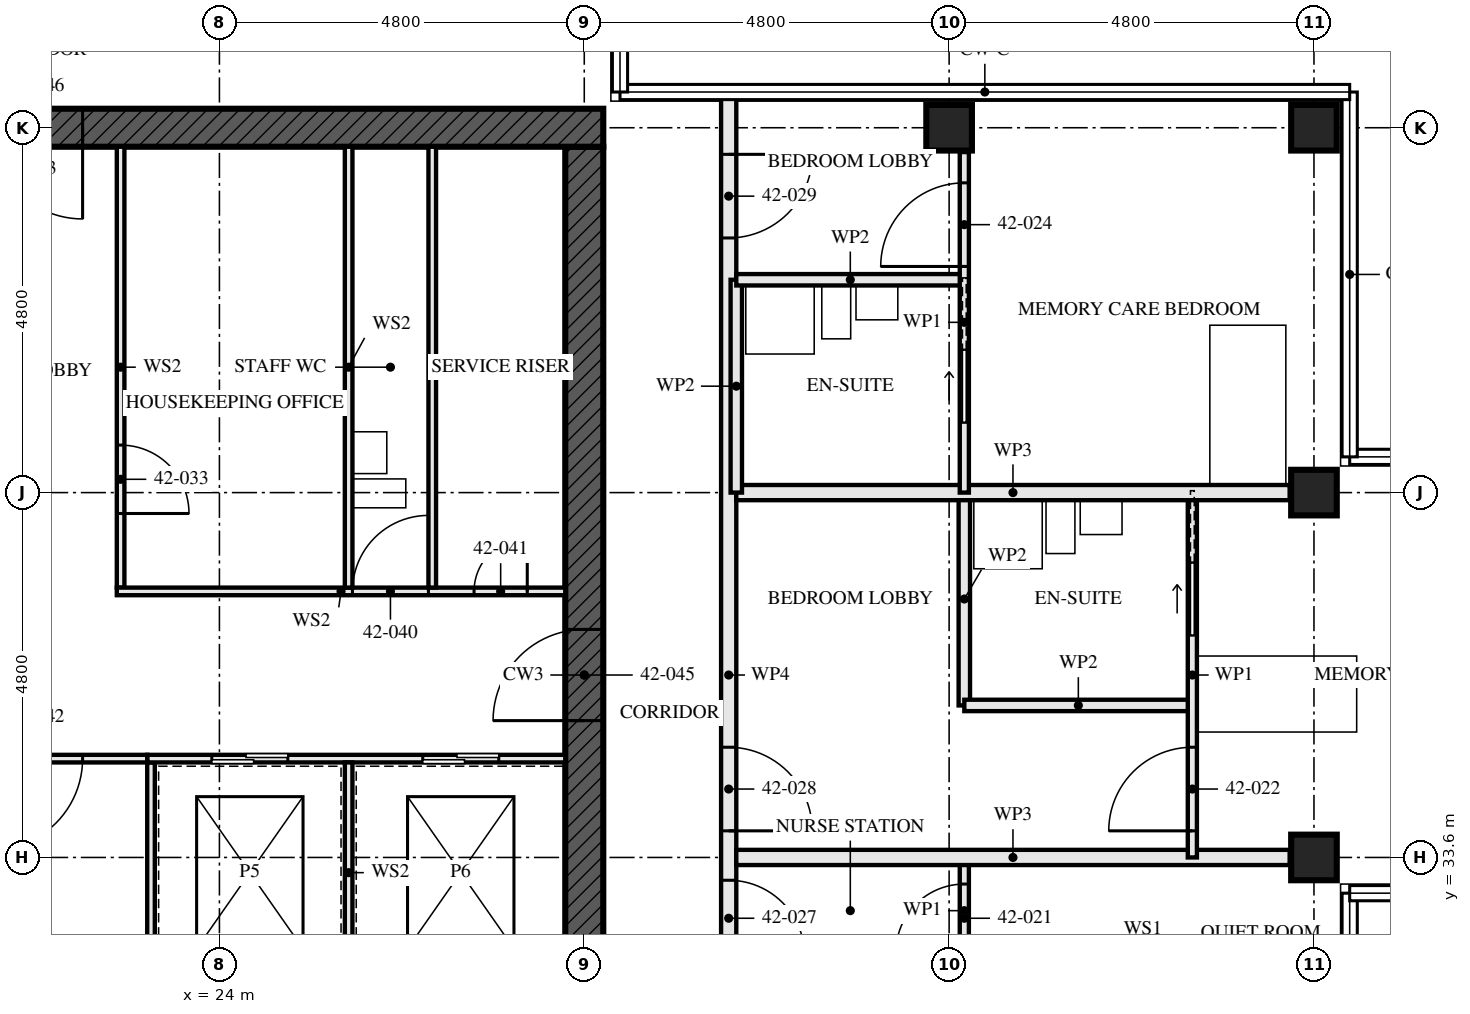
"""IFC4 building model, lengths in metres.
Left out: names, types, materials, properties, quantities, classifications, styles, units other than length and angle.
Written with IfcOpenShell. Run it as: python <this file> out.ifc"""

import sys

from ifc_helpers import new_model, si_unit, direction, frame, frame_2d, origin, origin_2d, place, context, subcontext, project, spatial, rectangle, hollow_rectangle, extrude, element, fill, save


model = new_model("IFC4")
c1 = context("Model", 3, precision=1e-05, world=origin(), true_north=direction((0.0, 1.0)))
c2 = subcontext(c1, "Body", "Model", "MODEL_VIEW")
j1 = project(units=[si_unit("LENGTHUNIT", "METRE"), si_unit("PLANEANGLEUNIT", "RADIAN")], contexts=[c1])
p1 = place(None, origin())
s1 = spatial("IfcSite", under=j1, at=p1, CompositionType="ELEMENT")
p2 = place(p1, origin())
s2 = spatial("IfcBuilding", under=s1, at=p2, CompositionType="ELEMENT")
p3 = place(p2, frame((0.0, 0.0, 155.0)))
s3 = spatial("IfcBuildingStorey", under=s2, at=p3, CompositionType="ELEMENT", Elevation=155.0)
p4 = place(p3, frame((33.6, 43.2, 0.0), z_axis=(0.0, 0.0, 1.0), x_axis=(0.0, 1.0, 0.0)))
e1 = element("IfcColumn", 1, at=p4, inside=s3, PredefinedType="COLUMN", context=c2, shape_type="SweptSolid", body=[
    extrude(hollow_rectangle(XDim=0.6, YDim=0.6, WallThickness=0.08, at=origin_2d()), origin(), (0.0, 0.0, 1.0), 3.5),
])
for number, where, z_axis, x_axis in (
    (2, (38.4, 33.6, 0.0), (0.0, 0.0, 1.0), (0.0, 1.0, 0.0)),
    (3, (38.4, 38.4, 0.0), (0.0, 0.0, 1.0), (0.0, 1.0, 0.0)),
    (4, (38.4, 43.2, 0.0), (0.0, 0.0, 1.0), (0.0, 1.0, 0.0)),
):
    element("IfcColumn", number, at=place(p3, frame(where, z_axis=z_axis, x_axis=x_axis)), inside=s3, PredefinedType="COLUMN", context=c2, shape_type="SweptSolid", body=[
        extrude(hollow_rectangle(XDim=0.6, YDim=0.6, WallThickness=0.06, at=origin_2d()), origin(), (0.0, 0.0, 1.0), 3.5),
    ])
p5 = place(p3, frame((29.05, 43.2, -0.17), z_axis=(0.0, 0.0, 1.0), x_axis=(-1.0, 0.0, 0.0)))
e5 = element("IfcWall", 5, at=p5, inside=s3, PredefinedType="SHEAR", context=c2, shape_type="SweptSolid", body=[
    extrude(rectangle(XDim=14.9, YDim=0.5, at=frame_2d((7.45, 0.0))), origin(), (0.0, 0.0, 1.0), 3.5),
])
p6 = place(p5, frame((6.85, 0.0, 0.17)))
e6 = element("IfcOpeningElement", 6, at=p6, cuts=e5, PredefinedType="OPENING", context=c2, shape_type="SweptSolid", body=[
    extrude(rectangle(XDim=1.2, YDim=2.1, at=frame_2d((0.6, 1.05))), frame((0.0, 0.26, 0.0), z_axis=(0.0, -1.0, 0.0), x_axis=(1.0, 0.0, 0.0)), (0.0, 0.0, 1.0), 0.521),
])
p7 = place(p3, frame((28.8, 29.05, -0.17), z_axis=(0.0, 0.0, 1.0), x_axis=(0.0, 1.0, 0.0)))
e7 = element("IfcWall", 7, at=p7, inside=s3, PredefinedType="SHEAR", context=c2, shape_type="SweptSolid", body=[
    extrude(rectangle(XDim=13.9, YDim=0.5, at=frame_2d((6.95, 0.0))), origin(), (0.0, 0.0, 1.0), 3.5),
])
p8 = place(p7, frame((6.35, 0.0, 0.17)))
e8 = element("IfcOpeningElement", 8, at=p8, cuts=e7, PredefinedType="OPENING", context=c2, shape_type="SweptSolid", body=[
    extrude(rectangle(XDim=1.2, YDim=2.1, at=frame_2d((0.6, 1.05))), frame((0.0, 0.26, 0.0), z_axis=(0.0, -1.0, 0.0), x_axis=(1.0, 0.0, 0.0)), (0.0, 0.0, 1.0), 0.521),
])
p9 = place(p3, frame((33.8, 32.2, 0.0), z_axis=(0.0, 0.0, 1.0), x_axis=(0.0, 1.0, 0.0)))
e9 = element("IfcWall", 9, at=p9, inside=s3, PredefinedType="PARTITIONING", context=c2, shape_type="SweptSolid", body=[
    extrude(rectangle(XDim=1.4, YDim=0.12, at=frame_2d((0.7, 0.0))), origin(), (0.0, 0.0, 1.0), 3.33),
])
p10 = place(p9, frame((0.15, 0.0, 0.0)))
e10 = element("IfcOpeningElement", 10, at=p10, cuts=e9, PredefinedType="OPENING", context=c2, shape_type="SweptSolid", body=[
    extrude(rectangle(XDim=0.9, YDim=2.1, at=frame_2d((0.45, 1.05))), frame((0.0, 0.071, 0.0), z_axis=(0.0, -1.0, 0.0), x_axis=(1.0, 0.0, 0.0)), (0.0, 0.0, 1.0), 0.141),
])
p11 = place(p3, frame((38.08, 33.6, 0.0), z_axis=(0.0, 0.0, 1.0), x_axis=(-1.0, 0.0, 0.0)))
e11 = element("IfcWall", 11, at=p11, inside=s3, PredefinedType="PARTITIONING", context=c2, shape_type="SweptSolid", body=[
    extrude(rectangle(XDim=7.28, YDim=0.2, at=frame_2d((3.64, 0.0))), origin(), (0.0, 0.0, 1.0), 2.55),
])
p12 = place(p3, frame((36.8, 35.6, 0.0), z_axis=(0.0, 0.0, 1.0), x_axis=(-1.0, 0.0, 0.0)))
e12 = element("IfcWall", 12, at=p12, inside=s3, PredefinedType="PARTITIONING", context=c2, shape_type="SweptSolid", body=[
    extrude(rectangle(XDim=3.0, YDim=0.15, at=frame_2d((1.5, 0.0))), origin(), (0.0, 0.0, 1.0), 3.33),
])
p13 = place(p3, frame((33.8, 35.6, 0.0), z_axis=(0.0, 0.0, 1.0), x_axis=(0.0, 1.0, 0.0)))
e13 = element("IfcWall", 13, at=p13, inside=s3, PredefinedType="PARTITIONING", context=c2, shape_type="SweptSolid", body=[
    extrude(rectangle(XDim=2.8, YDim=0.15, at=frame_2d((1.4, 0.0))), origin(), (0.0, 0.0, 1.0), 3.33),
])
p14 = place(p3, frame((36.8, 33.6, 0.0), z_axis=(0.0, 0.0, 1.0), x_axis=(0.0, 1.0, 0.0)))
e14 = element("IfcWall", 14, at=p14, inside=s3, PredefinedType="PARTITIONING", context=c2, shape_type="SweptSolid", body=[
    extrude(rectangle(XDim=4.8, YDim=0.12, at=frame_2d((2.4, 0.0))), origin(), (0.0, 0.0, 1.0), 3.33),
])
p15 = place(p14, frame((0.35, 0.0, 0.0)))
e15 = element("IfcOpeningElement", 15, at=p15, cuts=e14, PredefinedType="OPENING", context=c2, shape_type="SweptSolid", body=[
    extrude(rectangle(XDim=1.1, YDim=2.1, at=frame_2d((0.55, 1.05))), frame((0.0, 0.071, 0.0), z_axis=(0.0, -1.0, 0.0), x_axis=(1.0, 0.0, 0.0)), (0.0, 0.0, 1.0), 0.141),
])
p16 = place(p14, frame((2.925, 0.0, 0.0)))
e16 = element("IfcOpeningElement", 16, at=p16, cuts=e14, PredefinedType="OPENING", context=c2, shape_type="SweptSolid", body=[
    extrude(rectangle(XDim=0.95, YDim=2.1, at=frame_2d((0.475, 1.05))), frame((0.0, 0.071, 0.0), z_axis=(0.0, -1.0, 0.0), x_axis=(1.0, 0.0, 0.0)), (0.0, 0.0, 1.0), 0.141),
])
p17 = place(p3, frame((38.08, 38.4, 0.0), z_axis=(0.0, 0.0, 1.0), x_axis=(-1.0, 0.0, 0.0)))
e17 = element("IfcWall", 17, at=p17, inside=s3, PredefinedType="PARTITIONING", context=c2, shape_type="SweptSolid", body=[
    extrude(rectangle(XDim=7.28, YDim=0.2, at=frame_2d((3.64, 0.0))), origin(), (0.0, 0.0, 1.0), 2.55),
])
p18 = place(p3, frame((33.8, 41.2, 0.0), z_axis=(0.0, 0.0, 1.0), x_axis=(-1.0, 0.0, 0.0)))
e18 = element("IfcWall", 18, at=p18, inside=s3, PredefinedType="PARTITIONING", context=c2, shape_type="SweptSolid", body=[
    extrude(rectangle(XDim=3.0, YDim=0.15, at=frame_2d((1.5, 0.0))), origin(), (0.0, 0.0, 1.0), 3.33),
])
p19 = place(p3, frame((30.8, 38.4, 0.0), z_axis=(0.0, 0.0, 1.0), x_axis=(0.0, 1.0, 0.0)))
e19 = element("IfcWall", 19, at=p19, inside=s3, PredefinedType="PARTITIONING", context=c2, shape_type="SweptSolid", body=[
    extrude(rectangle(XDim=2.8, YDim=0.15, at=frame_2d((1.4, 0.0))), origin(), (0.0, 0.0, 1.0), 3.33),
])
p20 = place(p3, frame((33.8, 38.4, 0.0), z_axis=(0.0, 0.0, 1.0), x_axis=(0.0, 1.0, 0.0)))
e20 = element("IfcWall", 20, at=p20, inside=s3, PredefinedType="PARTITIONING", context=c2, shape_type="SweptSolid", body=[
    extrude(rectangle(XDim=4.48, YDim=0.12, at=frame_2d((2.24, 0.0))), origin(), (0.0, 0.0, 1.0), 3.33),
])
p21 = place(p20, frame((2.975, 0.0, 0.0)))
e21 = element("IfcOpeningElement", 21, at=p21, cuts=e20, PredefinedType="OPENING", context=c2, shape_type="SweptSolid", body=[
    extrude(rectangle(XDim=1.1, YDim=2.1, at=frame_2d((0.55, 1.05))), frame((0.0, 0.071, 0.0), z_axis=(0.0, -1.0, 0.0), x_axis=(1.0, 0.0, 0.0)), (0.0, 0.0, 1.0), 0.141),
])
p22 = place(p20, frame((0.925, 0.0, 0.0)))
e22 = element("IfcOpeningElement", 22, at=p22, cuts=e20, PredefinedType="OPENING", context=c2, shape_type="SweptSolid", body=[
    extrude(rectangle(XDim=0.95, YDim=2.1, at=frame_2d((0.475, 1.05))), frame((0.0, 0.071, 0.0), z_axis=(0.0, -1.0, 0.0), x_axis=(1.0, 0.0, 0.0)), (0.0, 0.0, 1.0), 0.141),
])
p23 = place(p3, frame((30.7, 28.35, 0.0), z_axis=(0.0, 0.0, 1.0), x_axis=(0.0, 1.0, 0.0)))
e23 = element("IfcWall", 23, at=p23, inside=s3, PredefinedType="PARTITIONING", context=c2, shape_type="SweptSolid", body=[
    extrude(rectangle(XDim=15.3, YDim=0.2, at=frame_2d((7.65, 0.0))), origin(), (0.0, 0.0, 1.0), 2.32),
])
p24 = place(p23, frame((1.85, 0.0, 0.0)))
e24 = element("IfcOpeningElement", 24, at=p24, cuts=e23, PredefinedType="OPENING", context=c2, shape_type="SweptSolid", body=[
    extrude(rectangle(XDim=1.0, YDim=2.1, at=frame_2d((0.5, 1.05))), frame((0.0, 0.111, 0.0), z_axis=(0.0, -1.0, 0.0), x_axis=(1.0, 0.0, 0.0)), (0.0, 0.0, 1.0), 0.221),
])
p25 = place(p23, frame((3.95, 0.0, 0.0)))
e25 = element("IfcOpeningElement", 25, at=p25, cuts=e23, PredefinedType="OPENING", context=c2, shape_type="SweptSolid", body=[
    extrude(rectangle(XDim=1.0, YDim=2.1, at=frame_2d((0.5, 1.05))), frame((0.0, 0.111, 0.0), z_axis=(0.0, -1.0, 0.0), x_axis=(1.0, 0.0, 0.0)), (0.0, 0.0, 1.0), 0.221),
])
p26 = place(p23, frame((5.6, 0.0, 0.0)))
e26 = element("IfcOpeningElement", 26, at=p26, cuts=e23, PredefinedType="OPENING", context=c2, shape_type="SweptSolid", body=[
    extrude(rectangle(XDim=1.1, YDim=2.1, at=frame_2d((0.55, 1.05))), frame((0.0, 0.111, 0.0), z_axis=(0.0, -1.0, 0.0), x_axis=(1.0, 0.0, 0.0)), (0.0, 0.0, 1.0), 0.221),
])
p27 = place(p23, frame((13.4, 0.0, 0.0)))
e27 = element("IfcOpeningElement", 27, at=p27, cuts=e23, PredefinedType="OPENING", context=c2, shape_type="SweptSolid", body=[
    extrude(rectangle(XDim=1.1, YDim=2.1, at=frame_2d((0.55, 1.05))), frame((0.0, 0.111, 0.0), z_axis=(0.0, -1.0, 0.0), x_axis=(1.0, 0.0, 0.0)), (0.0, 0.0, 1.0), 0.221),
])
p28 = place(p3, frame((26.8, 37.15, 0.0), z_axis=(0.0, 0.0, 1.0), x_axis=(0.0, 1.0, 0.0)))
e28 = element("IfcWall", 28, at=p28, inside=s3, PredefinedType="SOLIDWALL", context=c2, shape_type="SweptSolid", body=[
    extrude(rectangle(XDim=5.8, YDim=0.1, at=frame_2d((2.9, 0.0))), origin(), (0.0, 0.0, 1.0), 3.33),
])
p29 = place(p3, frame((22.7, 37.15, 0.0), z_axis=(0.0, 0.0, 1.0), x_axis=(0.0, 1.0, 0.0)))
e29 = element("IfcWall", 29, at=p29, inside=s3, PredefinedType="SOLIDWALL", context=c2, shape_type="SweptSolid", body=[
    extrude(rectangle(XDim=5.8, YDim=0.1, at=frame_2d((2.9, 0.0))), origin(), (0.0, 0.0, 1.0), 3.33),
])
p30 = place(p29, frame((0.975, 0.0, 0.0)))
e30 = element("IfcOpeningElement", 30, at=p30, cuts=e29, PredefinedType="OPENING", context=c2, shape_type="SweptSolid", body=[
    extrude(rectangle(XDim=0.9, YDim=2.1, at=frame_2d((0.45, 1.05))), frame((0.0, 0.061, 0.0), z_axis=(0.0, -1.0, 0.0), x_axis=(1.0, 0.0, 0.0)), (0.0, 0.0, 1.0), 0.121),
])
p31 = place(p3, frame((23.1, 29.05, 0.0), z_axis=(0.0, 0.0, 1.0), x_axis=(0.0, 1.0, 0.0)))
e31 = element("IfcWall", 31, at=p31, inside=s3, PredefinedType="SOLIDWALL", context=c2, shape_type="SweptSolid", body=[
    extrude(rectangle(XDim=5.8, YDim=0.1, at=frame_2d((2.9, 0.0))), origin(), (0.0, 0.0, 1.0), 3.33),
])
p32 = place(p31, frame((1.0, 0.0, 0.0)))
e32 = element("IfcOpeningElement", 32, at=p32, cuts=e31, PredefinedType="OPENING", context=c2, shape_type="SweptSolid", body=[
    extrude(rectangle(XDim=0.7, YDim=2.1, at=frame_2d((0.35, 1.05))), frame((0.0, 0.061, 0.0), z_axis=(0.0, -1.0, 0.0), x_axis=(1.0, 0.0, 0.0)), (0.0, 0.0, 1.0), 0.121),
])
p33 = place(p3, frame((23.05, 34.9, 0.0), z_axis=(0.0, 0.0, 1.0), x_axis=(1.0, 0.0, 0.0)))
e33 = element("IfcWall", 33, at=p33, inside=s3, PredefinedType="SOLIDWALL", context=c2, shape_type="SweptSolid", body=[
    extrude(rectangle(XDim=5.5, YDim=0.1, at=frame_2d((2.75, 0.0))), origin(), (0.0, 0.0, 1.0), 3.33),
])
p34 = place(p33, frame((0.85, 0.0, 0.0)))
e34 = element("IfcOpeningElement", 34, at=p34, cuts=e33, PredefinedType="OPENING", context=c2, shape_type="SweptSolid", body=[
    extrude(rectangle(XDim=1.0, YDim=2.1, at=frame_2d((0.5, 1.05))), frame((0.0, 0.061, 0.0), z_axis=(0.0, -1.0, 0.0), x_axis=(1.0, 0.0, 0.0)), (0.0, 0.0, 1.0), 0.121),
])
p35 = place(p33, frame((3.625, 0.0, 0.0)))
e35 = element("IfcOpeningElement", 35, at=p35, cuts=e33, PredefinedType="OPENING", context=c2, shape_type="SweptSolid", body=[
    extrude(rectangle(XDim=1.0, YDim=2.1, at=frame_2d((0.5, 1.05))), frame((0.0, 0.061, 0.0), z_axis=(0.0, -1.0, 0.0), x_axis=(1.0, 0.0, 0.0)), (0.0, 0.0, 1.0), 0.121),
])
p36 = place(p3, frame((22.65, 37.1, 0.0), z_axis=(0.0, 0.0, 1.0), x_axis=(1.0, 0.0, 0.0)))
e36 = element("IfcWall", 36, at=p36, inside=s3, PredefinedType="SOLIDWALL", context=c2, shape_type="SweptSolid", body=[
    extrude(rectangle(XDim=5.9, YDim=0.1, at=frame_2d((2.95, 0.0))), origin(), (0.0, 0.0, 1.0), 3.33),
])
p37 = place(p36, frame((3.1, 0.0, 0.0)))
e37 = element("IfcOpeningElement", 37, at=p37, cuts=e36, PredefinedType="OPENING", context=c2, shape_type="SweptSolid", body=[
    extrude(rectangle(XDim=1.0, YDim=2.1, at=frame_2d((0.5, 1.05))), frame((0.0, 0.061, 0.0), z_axis=(0.0, -1.0, 0.0), x_axis=(1.0, 0.0, 0.0)), (0.0, 0.0, 1.0), 0.121),
])
p38 = place(p36, frame((4.7, 0.0, 0.0)))
e38 = element("IfcOpeningElement", 38, at=p38, cuts=e36, PredefinedType="OPENING", context=c2, shape_type="SweptSolid", body=[
    extrude(rectangle(XDim=0.7, YDim=2.1, at=frame_2d((0.35, 1.05))), frame((0.0, 0.061, 0.0), z_axis=(0.0, -1.0, 0.0), x_axis=(1.0, 0.0, 0.0)), (0.0, 0.0, 1.0), 0.121),
])
p39 = place(p3, frame((20.55, 34.9, 0.0), z_axis=(0.0, 0.0, 1.0), x_axis=(1.0, 0.0, 0.0)))
e39 = element("IfcWall", 39, at=p39, inside=s3, PredefinedType="SOLIDWALL", context=c2, shape_type="SweptSolid", body=[
    extrude(rectangle(XDim=2.5, YDim=0.1, at=frame_2d((1.25, 0.0))), origin(), (0.0, 0.0, 1.0), 3.33),
])
p40 = place(p39, frame((0.45, 0.0, 0.0)))
e40 = element("IfcOpeningElement", 40, at=p40, cuts=e39, PredefinedType="OPENING", context=c2, shape_type="SweptSolid", body=[
    extrude(rectangle(XDim=1.2, YDim=2.1, at=frame_2d((0.6, 1.05))), frame((0.0, 0.061, 0.0), z_axis=(0.0, -1.0, 0.0), x_axis=(1.0, 0.0, 0.0)), (0.0, 0.0, 1.0), 0.121),
])
p41 = place(p3, frame((25.7, 37.15, 0.0), z_axis=(0.0, 0.0, 1.0), x_axis=(0.0, 1.0, 0.0)))
e41 = element("IfcWall", 41, at=p41, inside=s3, PredefinedType="SOLIDWALL", context=c2, shape_type="SweptSolid", body=[
    extrude(rectangle(XDim=5.8, YDim=0.1, at=frame_2d((2.9, 0.0))), origin(), (0.0, 0.0, 1.0), 3.33),
])
p42 = place(p3, frame((25.7, 31.95, 0.0), z_axis=(0.0, 0.0, 1.0), x_axis=(0.0, 1.0, 0.0)))
e42 = element("IfcWall", 42, at=p42, inside=s3, PredefinedType="SOLIDWALL", context=c2, shape_type="SweptSolid", body=[
    extrude(rectangle(XDim=2.9, YDim=0.1, at=frame_2d((1.45, 0.0))), origin(), (0.0, 0.0, 1.0), 3.33),
])
p43 = place(p10, origin())
e43 = element("IfcDoor", 43, at=p43, inside=s3, OperationType="SINGLE_SWING_RIGHT", PredefinedType="DOOR", context=c2, shape_type="SweptSolid", body=[
    extrude(rectangle(XDim=0.9, YDim=2.1, at=frame_2d((0.45, 1.05))), frame((0.0, 0.022, 0.0), z_axis=(0.0, -1.0, 0.0), x_axis=(1.0, 0.0, 0.0)), (0.0, 0.0, 1.0), 0.044),
])
fill(e10, e43)
p44 = place(p15, origin())
e44 = element("IfcDoor", 44, at=p44, inside=s3, OperationType="SINGLE_SWING_RIGHT", PredefinedType="DOOR", context=c2, shape_type="SweptSolid", body=[
    extrude(rectangle(XDim=1.1, YDim=2.1, at=frame_2d((0.55, 1.05))), frame((0.0, 0.022, 0.0), z_axis=(0.0, -1.0, 0.0), x_axis=(1.0, 0.0, 0.0)), (0.0, 0.0, 1.0), 0.044),
])
fill(e15, e44)
p45 = place(p16, origin())
e45 = element("IfcDoor", 45, at=p45, inside=s3, OperationType="SLIDING_TO_LEFT", PredefinedType="DOOR", context=c2, shape_type="SweptSolid", body=[
    extrude(rectangle(XDim=0.95, YDim=2.1, at=frame_2d((0.475, 1.05))), frame((0.0, 0.022, 0.0), z_axis=(0.0, -1.0, 0.0), x_axis=(1.0, 0.0, 0.0)), (0.0, 0.0, 1.0), 0.044),
])
fill(e16, e45)
p46 = place(p21, origin())
e46 = element("IfcDoor", 46, at=p46, inside=s3, OperationType="SINGLE_SWING_RIGHT", PredefinedType="DOOR", context=c2, shape_type="SweptSolid", body=[
    extrude(rectangle(XDim=1.1, YDim=2.1, at=frame_2d((0.55, 1.05))), frame((0.0, 0.022, 0.0), z_axis=(0.0, -1.0, 0.0), x_axis=(1.0, 0.0, 0.0)), (0.0, 0.0, 1.0), 0.044),
])
fill(e21, e46)
p47 = place(p22, origin())
e47 = element("IfcDoor", 47, at=p47, inside=s3, OperationType="SLIDING_TO_LEFT", PredefinedType="DOOR", context=c2, shape_type="SweptSolid", body=[
    extrude(rectangle(XDim=0.95, YDim=2.1, at=frame_2d((0.475, 1.05))), frame((0.0, 0.022, 0.0), z_axis=(0.0, -1.0, 0.0), x_axis=(1.0, 0.0, 0.0)), (0.0, 0.0, 1.0), 0.044),
])
fill(e22, e47)
p48 = place(p25, frame((1.0, 0.0, 0.0), z_axis=(0.0, 0.0, 1.0), x_axis=(-1.0, 0.0, 0.0)))
e48 = element("IfcDoor", 48, at=p48, inside=s3, OperationType="SINGLE_SWING_LEFT", PredefinedType="DOOR", context=c2, shape_type="SweptSolid", body=[
    extrude(rectangle(XDim=1.0, YDim=2.1, at=frame_2d((0.5, 1.05))), frame((0.0, 0.027, 0.0), z_axis=(0.0, -1.0, 0.0), x_axis=(1.0, 0.0, 0.0)), (0.0, 0.0, 1.0), 0.054),
])
fill(e25, e48)
p49 = place(p26, frame((1.1, 0.0, 0.0), z_axis=(0.0, 0.0, 1.0), x_axis=(-1.0, 0.0, 0.0)))
e49 = element("IfcDoor", 49, at=p49, inside=s3, OperationType="SINGLE_SWING_LEFT", PredefinedType="DOOR", context=c2, shape_type="SweptSolid", body=[
    extrude(rectangle(XDim=1.1, YDim=2.1, at=frame_2d((0.55, 1.05))), frame((0.0, 0.027, 0.0), z_axis=(0.0, -1.0, 0.0), x_axis=(1.0, 0.0, 0.0)), (0.0, 0.0, 1.0), 0.054),
])
fill(e26, e49)
p50 = place(p27, frame((1.1, 0.0, 0.0), z_axis=(0.0, 0.0, 1.0), x_axis=(-1.0, 0.0, 0.0)))
e50 = element("IfcDoor", 50, at=p50, inside=s3, OperationType="SINGLE_SWING_RIGHT", PredefinedType="DOOR", context=c2, shape_type="SweptSolid", body=[
    extrude(rectangle(XDim=1.1, YDim=2.1, at=frame_2d((0.55, 1.05))), frame((0.0, 0.027, 0.0), z_axis=(0.0, -1.0, 0.0), x_axis=(1.0, 0.0, 0.0)), (0.0, 0.0, 1.0), 0.054),
])
fill(e27, e50)
p51 = place(p30, frame((0.9, 0.0, 0.0), z_axis=(0.0, 0.0, 1.0), x_axis=(-1.0, 0.0, 0.0)))
e51 = element("IfcDoor", 51, at=p51, inside=s3, OperationType="SINGLE_SWING_LEFT", PredefinedType="DOOR", context=c2, shape_type="SweptSolid", body=[
    extrude(rectangle(XDim=0.9, YDim=2.1, at=frame_2d((0.45, 1.05))), frame((0.0, 0.027, 0.0), z_axis=(0.0, -1.0, 0.0), x_axis=(1.0, 0.0, 0.0)), (0.0, 0.0, 1.0), 0.054),
])
fill(e30, e51)
p52 = place(p34, origin())
e52 = element("IfcDoor", 52, at=p52, inside=s3, OperationType="SLIDING_TO_LEFT", PredefinedType="DOOR", context=c2, shape_type="SweptSolid", body=[
    extrude(rectangle(XDim=1.0, YDim=2.1, at=frame_2d((0.5, 1.05))), frame((0.0, 0.05, 0.0), z_axis=(0.0, -1.0, 0.0), x_axis=(1.0, 0.0, 0.0)), (0.0, 0.0, 1.0), 0.1),
])
fill(e34, e52)
p53 = place(p35, origin())
e53 = element("IfcDoor", 53, at=p53, inside=s3, OperationType="SLIDING_TO_LEFT", PredefinedType="DOOR", context=c2, shape_type="SweptSolid", body=[
    extrude(rectangle(XDim=1.0, YDim=2.1, at=frame_2d((0.5, 1.05))), frame((0.0, 0.05, 0.0), z_axis=(0.0, -1.0, 0.0), x_axis=(1.0, 0.0, 0.0)), (0.0, 0.0, 1.0), 0.1),
])
fill(e35, e53)
p54 = place(p37, origin())
e54 = element("IfcDoor", 54, at=p54, inside=s3, OperationType="SINGLE_SWING_LEFT", PredefinedType="DOOR", context=c2, shape_type="SweptSolid", body=[
    extrude(rectangle(XDim=1.0, YDim=2.1, at=frame_2d((0.5, 1.05))), frame((0.0, 0.027, 0.0), z_axis=(0.0, -1.0, 0.0), x_axis=(1.0, 0.0, 0.0)), (0.0, 0.0, 1.0), 0.054),
])
fill(e37, e54)
p55 = place(p38, origin())
e55 = element("IfcDoor", 55, at=p55, inside=s3, OperationType="SINGLE_SWING_LEFT", PredefinedType="DOOR", context=c2, shape_type="SweptSolid", body=[
    extrude(rectangle(XDim=0.7, YDim=2.1, at=frame_2d((0.35, 1.05))), frame((0.0, 0.027, 0.0), z_axis=(0.0, -1.0, 0.0), x_axis=(1.0, 0.0, 0.0)), (0.0, 0.0, 1.0), 0.054),
])
fill(e38, e55)
p56 = place(p40, frame((1.2, 0.0, 0.0), z_axis=(0.0, 0.0, 1.0), x_axis=(-1.0, 0.0, 0.0)))
e56 = element("IfcDoor", 56, at=p56, inside=s3, OperationType="SINGLE_SWING_LEFT", PredefinedType="DOOR", context=c2, shape_type="SweptSolid", body=[
    extrude(rectangle(XDim=1.2, YDim=2.1, at=frame_2d((0.6, 1.05))), frame((0.0, 0.027, 0.0), z_axis=(0.0, -1.0, 0.0), x_axis=(1.0, 0.0, 0.0)), (0.0, 0.0, 1.0), 0.054),
])
fill(e40, e56)
p57 = place(p8, origin())
e57 = element("IfcDoor", 57, at=p57, inside=s3, OperationType="SINGLE_SWING_LEFT", PredefinedType="DOOR", context=c2, shape_type="SweptSolid", body=[
    extrude(rectangle(XDim=1.2, YDim=2.1, at=frame_2d((0.6, 1.05))), frame((0.0, 0.027, 0.0), z_axis=(0.0, -1.0, 0.0), x_axis=(1.0, 0.0, 0.0)), (0.0, 0.0, 1.0), 0.054),
])
fill(e8, e57)
p58 = place(p6, origin())
e58 = element("IfcDoor", 58, at=p58, inside=s3, OperationType="SINGLE_SWING_LEFT", PredefinedType="DOOR", context=c2, shape_type="SweptSolid", body=[
    extrude(rectangle(XDim=1.2, YDim=2.1, at=frame_2d((0.6, 1.05))), frame((0.0, 0.027, 0.0), z_axis=(0.0, -1.0, 0.0), x_axis=(1.0, 0.0, 0.0)), (0.0, 0.0, 1.0), 0.054),
])
fill(e6, e58)
save(model, sys.argv[1])
